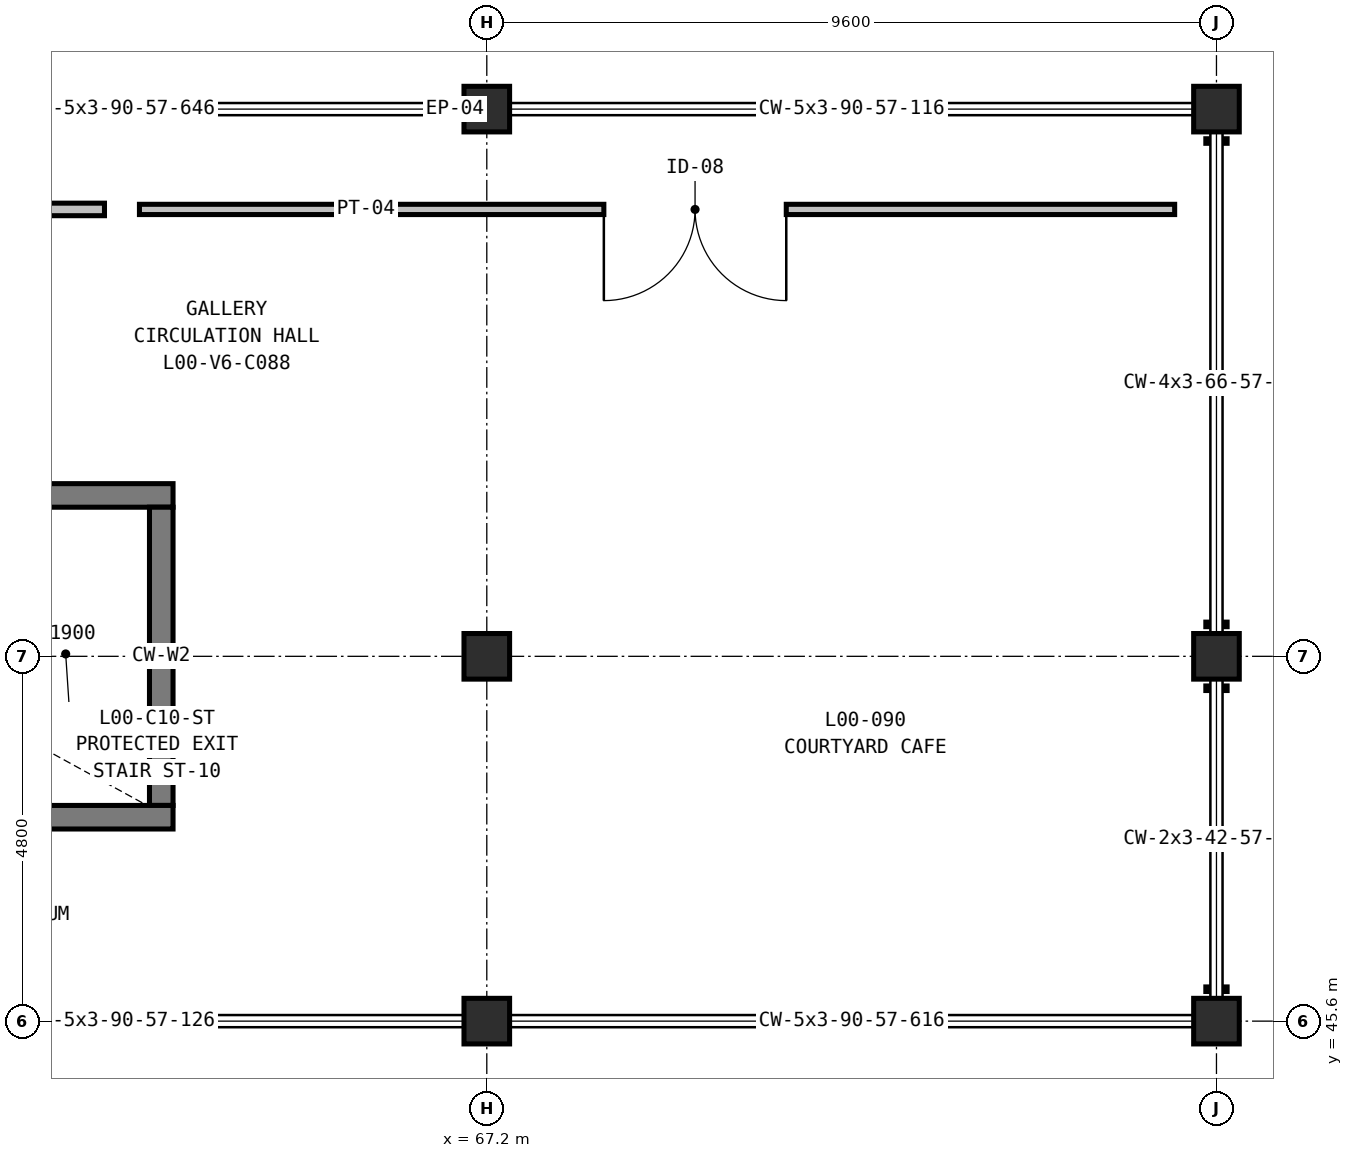
"""IFC4 building model, lengths in metres.
Left out: names, types, materials, properties, quantities, classifications, styles, units other than length and angle.
Written with IfcOpenShell. Run it as: python <this file> out.ifc"""

import sys

from ifc_helpers import new_model, si_unit, direction, frame, frame_2d, origin, origin_2d, place, context, subcontext, project, spatial, rectangle, extrude, element, fill, save


model = new_model("IFC4")
c1 = context("Model", 3, precision=1e-05, world=origin(), true_north=direction((0.0, 1.0)))
c2 = subcontext(c1, "Body", "Model", "MODEL_VIEW")
j1 = project(units=[si_unit("LENGTHUNIT", "METRE"), si_unit("PLANEANGLEUNIT", "RADIAN")], contexts=[c1])
p1 = place(None, origin())
s1 = spatial("IfcSite", under=j1, at=p1, CompositionType="ELEMENT")
p2 = place(p1, origin())
s2 = spatial("IfcBuilding", under=s1, at=p2, CompositionType="ELEMENT")
p3 = place(p2, origin())
s3 = spatial("IfcBuildingStorey", under=s2, at=p3, CompositionType="ELEMENT", Elevation=0.0)
for number, where, z_axis, x_axis in (
    (1, (67.2, 45.6, 0.0), (0.0, 0.0, 1.0), (1.0, 0.0, 0.0)),
    (2, (67.2, 50.4, 0.0), (0.0, 0.0, 1.0), (1.0, 0.0, 0.0)),
    (3, (67.2, 57.6, 0.0), (0.0, 0.0, 1.0), (1.0, 0.0, 0.0)),
    (4, (76.8, 45.6, 0.0), (0.0, 0.0, 1.0), (1.0, 0.0, 0.0)),
    (5, (76.8, 50.4, 0.0), (0.0, 0.0, 1.0), (1.0, 0.0, 0.0)),
    (6, (76.8, 57.6, 0.0), (0.0, 0.0, 1.0), (1.0, 0.0, 0.0)),
):
    element("IfcColumn", number, at=place(p3, frame(where, z_axis=z_axis, x_axis=x_axis)), inside=s3, PredefinedType="COLUMN", context=c2, shape_type="SweptSolid", body=[
        extrude(rectangle(XDim=0.6, YDim=0.6, at=origin_2d()), origin(), (0.0, 0.0, 1.0), 6.0),
    ])
p4 = place(p3, frame((53.328, 52.517, 0.0), z_axis=(0.0, 0.0, 1.0), x_axis=(1.0, 0.0, 0.0)))
e7 = element("IfcWall", 7, at=p4, inside=s3, PredefinedType="SHEAR", context=c2, shape_type="SweptSolid", body=[
    extrude(rectangle(XDim=9.744, YDim=0.31, at=frame_2d((4.872, 0.0))), origin(), (0.0, 0.0, 1.0), 5.68),
])
p5 = place(p3, frame((62.917, 52.362, 0.0), z_axis=(0.0, 0.0, 1.0), x_axis=(0.0, -1.0, 0.0)))
e8 = element("IfcWall", 8, at=p5, inside=s3, PredefinedType="SHEAR", context=c2, shape_type="SweptSolid", body=[
    extrude(rectangle(XDim=3.924, YDim=0.31, at=frame_2d((1.962, 0.0))), origin(), (0.0, 0.0, 1.0), 5.68),
])
p6 = place(p3, frame((63.072, 48.283, 0.0), z_axis=(0.0, 0.0, 1.0), x_axis=(-1.0, 0.0, 0.0)))
e9 = element("IfcWall", 9, at=p6, inside=s3, PredefinedType="SHEAR", context=c2, shape_type="SweptSolid", body=[
    extrude(rectangle(XDim=9.744, YDim=0.31, at=frame_2d((4.872, 0.0))), origin(), (0.0, 0.0, 1.0), 5.68),
])
p7 = place(p3, frame((62.17, 56.28, 0.0), z_axis=(0.0, 0.0, 1.0), x_axis=(-1.0, 0.0, 0.0)))
e10 = element("IfcWall", 10, at=p7, inside=s3, PredefinedType="PARTITIONING", context=c2, shape_type="SweptSolid", body=[
    extrude(rectangle(XDim=13.62, YDim=0.165, at=frame_2d((6.81, 0.0))), origin(), (0.0, 0.0, 1.0), 5.68),
])
p8 = place(p7, frame((6.31, 0.0, 0.0)))
e11 = element("IfcOpeningElement", 11, at=p8, cuts=e10, PredefinedType="OPENING", context=c2, shape_type="SweptSolid", body=[
    extrude(rectangle(XDim=1.0, YDim=2.15, at=frame_2d((0.5, 1.075))), frame((0.0, 0.093, 0.0), z_axis=(0.0, -1.0, 0.0), x_axis=(1.0, 0.0, 0.0)), (0.0, 0.0, 1.0), 0.185),
])
p9 = place(p3, frame((76.25, 56.28, 0.0), z_axis=(0.0, 0.0, 1.0), x_axis=(-1.0, 0.0, 0.0)))
e12 = element("IfcWall", 12, at=p9, inside=s3, PredefinedType="PARTITIONING", context=c2, shape_type="SweptSolid", body=[
    extrude(rectangle(XDim=13.62, YDim=0.135, at=frame_2d((6.81, 0.0))), origin(), (0.0, 0.0, 1.0), 4.955),
])
p10 = place(p9, frame((5.11, 0.0, 0.0)))
e13 = element("IfcOpeningElement", 13, at=p10, cuts=e12, PredefinedType="OPENING", context=c2, shape_type="SweptSolid", body=[
    extrude(rectangle(XDim=2.4, YDim=2.6, at=frame_2d((1.2, 1.3))), frame((0.0, 0.077, 0.0), z_axis=(0.0, -1.0, 0.0), x_axis=(1.0, 0.0, 0.0)), (0.0, 0.0, 1.0), 0.155),
])
p11 = place(p10, origin())
e14 = element("IfcDoor", 14, at=p11, inside=s3, OperationType="DOUBLE_DOOR_SINGLE_SWING", PredefinedType="DOOR", context=c2, shape_type="SweptSolid", body=[
    extrude(rectangle(XDim=2.4, YDim=2.6, at=frame_2d((1.2, 1.3))), frame((0.0, 0.025, 0.0), z_axis=(0.0, -1.0, 0.0), x_axis=(1.0, 0.0, 0.0)), (0.0, 0.0, 1.0), 0.05),
])
fill(e13, e14)
save(model, sys.argv[1])
